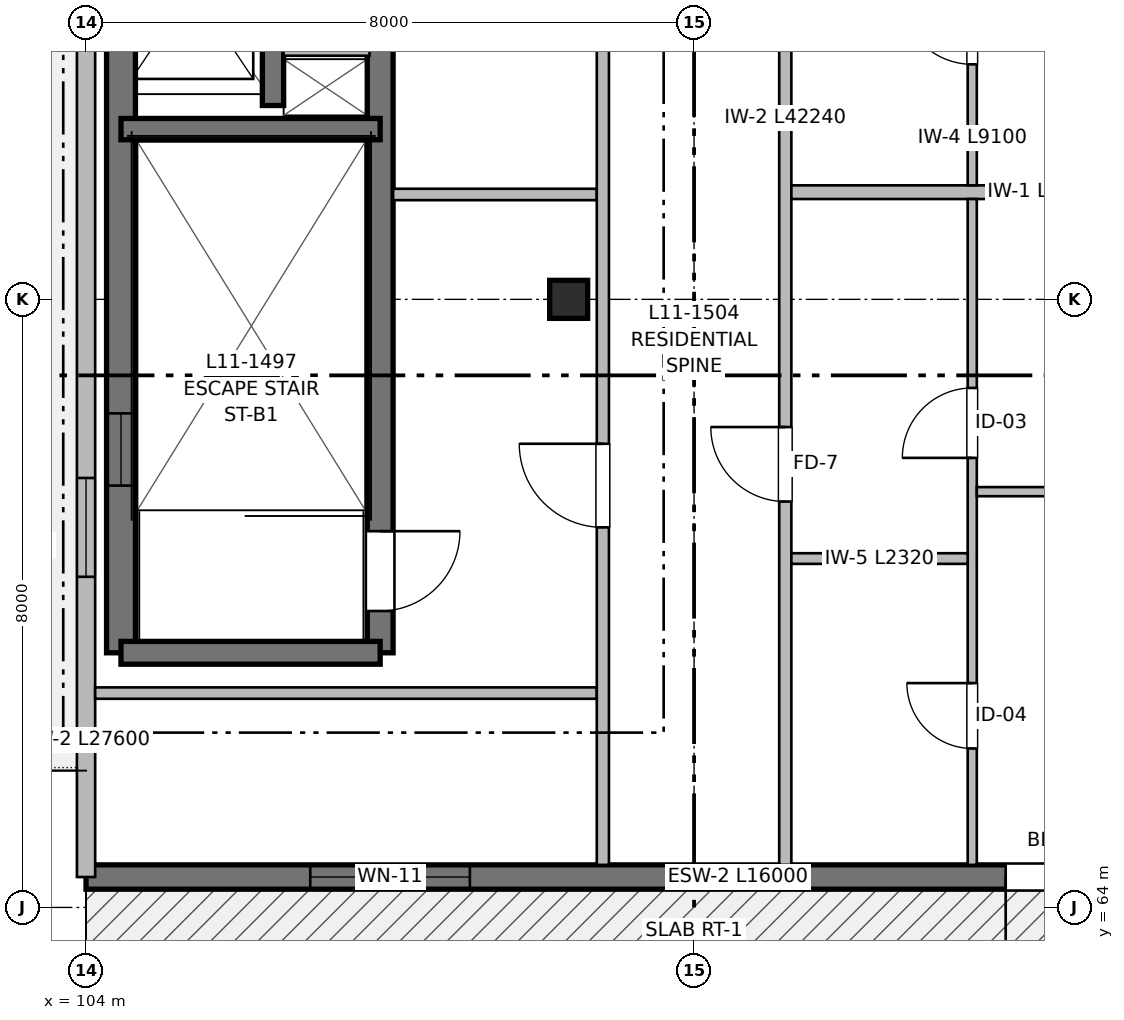
"""IFC4 building model, lengths in metres.
Left out: names, types, materials, properties, quantities, classifications, styles, units other than length and angle.
Written with IfcOpenShell. Run it as: python <this file> out.ifc"""

import sys

from ifc_helpers import new_model, si_unit, direction, frame, frame_2d, origin, origin_2d, place, context, subcontext, project, spatial, rectangle, extrude, element, fill, save


model = new_model("IFC4")
c1 = context("Model", 3, precision=1e-05, world=origin(), true_north=direction((0.0, 1.0)))
c2 = subcontext(c1, "Body", "Model", "MODEL_VIEW")
j1 = project(units=[si_unit("LENGTHUNIT", "METRE"), si_unit("PLANEANGLEUNIT", "RADIAN")], contexts=[c1])
p1 = place(None, origin())
s1 = spatial("IfcSite", under=j1, at=p1, CompositionType="ELEMENT")
p2 = place(p1, origin())
s2 = spatial("IfcBuilding", under=s1, at=p2, CompositionType="ELEMENT")
p3 = place(p2, frame((0.0, 0.0, 36.16)))
s3 = spatial("IfcBuildingStorey", under=s2, at=p3, CompositionType="ELEMENT", Elevation=36.16)
p4 = place(p3, frame((110.35, 72.0, 0.0), z_axis=(0.0, 0.0, 1.0), x_axis=(1.0, 0.0, 0.0)))
e1 = element("IfcColumn", 1, at=p4, inside=s3, PredefinedType="COLUMN", context=c2, shape_type="SweptSolid", body=[
    extrude(rectangle(XDim=0.5, YDim=0.5, at=origin_2d()), origin(), (0.0, 0.0, 1.0), 3.2),
])
p5 = place(p3, frame((104.46, 67.35, 0.0), z_axis=(0.0, 0.0, 1.0), x_axis=(0.0, 1.0, 0.0)))
e2 = element("IfcWall", 2, at=p5, inside=s3, PredefinedType="SHEAR", context=c2, shape_type="SweptSolid", body=[
    extrude(rectangle(XDim=12.45, YDim=0.38, at=frame_2d((6.225, 0.0))), origin(), (0.0, 0.0, 1.0), 3.2),
])
p6 = place(p5, frame((2.2, 0.0, 0.97)))
e3 = element("IfcOpeningElement", 3, at=p6, cuts=e2, PredefinedType="OPENING", context=c2, shape_type="SweptSolid", body=[
    extrude(rectangle(XDim=0.95, YDim=1.25, at=frame_2d((0.475, 0.625))), frame((0.0, 0.2, 0.0), z_axis=(0.0, -1.0, 0.0), x_axis=(1.0, 0.0, 0.0)), (0.0, 0.0, 1.0), 0.4),
])
p7 = place(p3, frame((107.87, 79.8, 0.0), z_axis=(0.0, 0.0, 1.0), x_axis=(0.0, -1.0, 0.0)))
e4 = element("IfcWall", 4, at=p7, inside=s3, PredefinedType="SHEAR", context=c2, shape_type="SweptSolid", body=[
    extrude(rectangle(XDim=12.45, YDim=0.34, at=frame_2d((6.225, 0.0))), origin(), (0.0, 0.0, 1.0), 3.2),
])
p8 = place(p7, frame((10.85, 0.0, 0.0)))
e5 = element("IfcOpeningElement", 5, at=p8, cuts=e4, PredefinedType="OPENING", context=c2, shape_type="SweptSolid", body=[
    extrude(rectangle(XDim=1.05, YDim=2.15, at=frame_2d((0.525, 1.075))), frame((0.0, 0.18, 0.0), z_axis=(0.0, -1.0, 0.0), x_axis=(1.0, 0.0, 0.0)), (0.0, 0.0, 1.0), 0.36),
])
p9 = place(p3, frame((107.87, 67.35, 0.0), z_axis=(0.0, 0.0, 1.0), x_axis=(-1.0, 0.0, 0.0)))
e6 = element("IfcWall", 6, at=p9, inside=s3, PredefinedType="SHEAR", context=c2, shape_type="SweptSolid", body=[
    extrude(rectangle(XDim=3.41, YDim=0.3, at=frame_2d((1.705, 0.0))), origin(), (0.0, 0.0, 1.0), 3.2),
])
p10 = place(p3, frame((104.46, 74.24, 0.0), z_axis=(0.0, 0.0, 1.0), x_axis=(1.0, 0.0, 0.0)))
e7 = element("IfcWall", 7, at=p10, inside=s3, PredefinedType="SHEAR", context=c2, shape_type="SweptSolid", body=[
    extrude(rectangle(XDim=3.41, YDim=0.28, at=frame_2d((1.705, 0.0))), origin(), (0.0, 0.0, 1.0), 3.2),
])
p11 = place(p3, frame((106.46, 74.55, 0.0), z_axis=(0.0, 0.0, 1.0), x_axis=(0.0, 1.0, 0.0)))
e8 = element("IfcWall", 8, at=p11, inside=s3, PredefinedType="SHEAR", context=c2, shape_type="SweptSolid", body=[
    extrude(rectangle(XDim=5.25, YDim=0.28, at=frame_2d((2.625, 0.0))), origin(), (0.0, 0.0, 1.0), 3.2),
])
p12 = place(p11, frame((1.15, 0.0, 0.0)))
e9 = element("IfcOpeningElement", 9, at=p12, cuts=e8, PredefinedType="OPENING", context=c2, shape_type="SweptSolid", body=[
    extrude(rectangle(XDim=1.0, YDim=2.15, at=frame_2d((0.5, 1.075))), frame((0.0, 0.15, 0.0), z_axis=(0.0, -1.0, 0.0), x_axis=(1.0, 0.0, 0.0)), (0.0, 0.0, 1.0), 0.3),
])
p13 = place(p11, frame((3.85, 0.0, 0.0)))
e10 = element("IfcOpeningElement", 10, at=p13, cuts=e8, PredefinedType="OPENING", context=c2, shape_type="SweptSolid", body=[
    extrude(rectangle(XDim=0.9, YDim=2.15, at=frame_2d((0.45, 1.075))), frame((0.0, 0.15, 0.0), z_axis=(0.0, -1.0, 0.0), x_axis=(1.0, 0.0, 0.0)), (0.0, 0.0, 1.0), 0.3),
])
p14 = place(p3, frame((106.6, 75.28, 0.0), z_axis=(0.0, 0.0, 1.0), x_axis=(1.0, 0.0, 0.0)))
e11 = element("IfcWall", 11, at=p14, inside=s3, PredefinedType="PARTITIONING", context=c2, shape_type="SweptSolid", body=[
    extrude(rectangle(XDim=1.13, YDim=0.15, at=frame_2d((0.565, 0.0))), origin(), (0.0, 0.0, 1.0), 2.95),
])
p15 = place(p3, frame((120.0, 64.4, 0.0), z_axis=(0.0, 0.0, 1.0), x_axis=(-1.0, 0.0, 0.0)))
e12 = element("IfcWall", 12, at=p15, inside=s3, PredefinedType="SHEAR", context=c2, shape_type="SweptSolid", body=[
    extrude(rectangle(XDim=16.0, YDim=0.32, at=frame_2d((8.0, 0.0))), origin(), (0.0, 0.0, 1.0), 2.98),
])
p16 = place(p15, frame((2.55, 0.0, 0.0)))
e13 = element("IfcOpeningElement", 13, at=p16, cuts=e12, PredefinedType="OPENING", context=c2, shape_type="SweptSolid", body=[
    extrude(rectangle(XDim=1.35, YDim=2.2, at=frame_2d((0.675, 1.1))), frame((0.0, 0.17, 0.0), z_axis=(0.0, -1.0, 0.0), x_axis=(1.0, 0.0, 0.0)), (0.0, 0.0, 1.0), 0.34),
])
p17 = place(p15, frame((10.95, 0.0, 0.67)))
e14 = element("IfcOpeningElement", 14, at=p17, cuts=e12, PredefinedType="OPENING", context=c2, shape_type="SweptSolid", body=[
    extrude(rectangle(XDim=2.1, YDim=1.55, at=frame_2d((1.05, 0.775))), frame((0.0, 0.17, 0.0), z_axis=(0.0, -1.0, 0.0), x_axis=(1.0, 0.0, 0.0)), (0.0, 0.0, 1.0), 0.34),
])
p18 = place(p3, frame((104.0, 64.4, 0.0), z_axis=(0.0, 0.0, 1.0), x_axis=(0.0, 1.0, 0.0)))
e15 = element("IfcWall", 15, at=p18, inside=s3, PredefinedType="SOLIDWALL", context=c2, shape_type="SweptSolid", body=[
    extrude(rectangle(XDim=27.6, YDim=0.24, at=frame_2d((13.8, 0.0))), origin(), (0.0, 0.0, 1.0), 2.98),
])
p19 = place(p18, frame((3.95, 0.0, 0.82)))
e16 = element("IfcOpeningElement", 16, at=p19, cuts=e15, PredefinedType="OPENING", context=c2, shape_type="SweptSolid", body=[
    extrude(rectangle(XDim=1.3, YDim=1.4, at=frame_2d((0.65, 0.7))), frame((0.0, 0.13, 0.0), z_axis=(0.0, -1.0, 0.0), x_axis=(1.0, 0.0, 0.0)), (0.0, 0.0, 1.0), 0.26),
])
p20 = place(p18, frame((10.95, 0.0, 0.67)))
e17 = element("IfcOpeningElement", 17, at=p20, cuts=e15, PredefinedType="OPENING", context=c2, shape_type="SweptSolid", body=[
    extrude(rectangle(XDim=2.1, YDim=1.55, at=frame_2d((1.05, 0.775))), frame((0.0, 0.13, 0.0), z_axis=(0.0, -1.0, 0.0), x_axis=(1.0, 0.0, 0.0)), (0.0, 0.0, 1.0), 0.26),
])
p21 = place(p18, frame((21.6, 0.0, 0.0)))
e18 = element("IfcOpeningElement", 18, at=p21, cuts=e15, PredefinedType="OPENING", context=c2, shape_type="SweptSolid", body=[
    extrude(rectangle(XDim=1.2, YDim=2.2, at=frame_2d((0.6, 1.1))), frame((0.0, 0.13, 0.0), z_axis=(0.0, -1.0, 0.0), x_axis=(1.0, 0.0, 0.0)), (0.0, 0.0, 1.0), 0.26),
])
p22 = place(p18, frame((24.3, 0.0, 0.77)))
e19 = element("IfcOpeningElement", 19, at=p22, cuts=e15, PredefinedType="OPENING", context=c2, shape_type="SweptSolid", body=[
    extrude(rectangle(XDim=1.6, YDim=1.45, at=frame_2d((0.8, 0.725))), frame((0.0, 0.13, 0.0), z_axis=(0.0, -1.0, 0.0), x_axis=(1.0, 0.0, 0.0)), (0.0, 0.0, 1.0), 0.26),
])
p23 = place(p3, frame((104.12, 66.82, 0.0), z_axis=(0.0, 0.0, 1.0), x_axis=(1.0, 0.0, 0.0)))
e20 = element("IfcWall", 20, at=p23, inside=s3, PredefinedType="PARTITIONING", context=c2, shape_type="SweptSolid", body=[
    extrude(rectangle(XDim=6.6, YDim=0.15, at=frame_2d((3.3, 0.0))), origin(), (0.0, 0.0, 1.0), 2.935),
])
p24 = place(p3, frame((108.04, 73.38, 0.0), z_axis=(0.0, 0.0, 1.0), x_axis=(1.0, 0.0, 0.0)))
e21 = element("IfcWall", 21, at=p24, inside=s3, PredefinedType="PARTITIONING", context=c2, shape_type="SweptSolid", body=[
    extrude(rectangle(XDim=2.68, YDim=0.15, at=frame_2d((1.34, 0.0))), origin(), (0.0, 0.0, 1.0), 2.935),
])
p25 = place(p3, frame((110.8, 64.56, 0.0), z_axis=(0.0, 0.0, 1.0), x_axis=(0.0, 1.0, 0.0)))
e22 = element("IfcWall", 22, at=p25, inside=s3, PredefinedType="PARTITIONING", context=c2, shape_type="SweptSolid", body=[
    extrude(rectangle(XDim=42.24, YDim=0.16, at=frame_2d((21.12, 0.0))), origin(), (0.0, 0.0, 1.0), 2.935),
])
p26 = place(p25, frame((4.44, 0.0, 0.0)))
e23 = element("IfcOpeningElement", 23, at=p26, cuts=e22, PredefinedType="OPENING", context=c2, shape_type="SweptSolid", body=[
    extrude(rectangle(XDim=1.1, YDim=2.15, at=frame_2d((0.55, 1.075))), frame((0.0, 0.09, 0.0), z_axis=(0.0, -1.0, 0.0), x_axis=(1.0, 0.0, 0.0)), (0.0, 0.0, 1.0), 0.18),
])
p27 = place(p25, frame((10.84, 0.0, 0.0)))
e24 = element("IfcOpeningElement", 24, at=p27, cuts=e22, PredefinedType="OPENING", context=c2, shape_type="SweptSolid", body=[
    extrude(rectangle(XDim=1.6, YDim=2.15, at=frame_2d((0.8, 1.075))), frame((0.0, 0.09, 0.0), z_axis=(0.0, -1.0, 0.0), x_axis=(1.0, 0.0, 0.0)), (0.0, 0.0, 1.0), 0.18),
])
p28 = place(p25, frame((24.245, 0.0, 0.0)))
e25 = element("IfcOpeningElement", 25, at=p28, cuts=e22, PredefinedType="OPENING", context=c2, shape_type="SweptSolid", body=[
    extrude(rectangle(XDim=0.98, YDim=2.15, at=frame_2d((0.49, 1.075))), frame((0.0, 0.09, 0.0), z_axis=(0.0, -1.0, 0.0), x_axis=(1.0, 0.0, 0.0)), (0.0, 0.0, 1.0), 0.18),
])
p29 = place(p25, frame((32.855, 0.0, 0.0)))
e26 = element("IfcOpeningElement", 26, at=p29, cuts=e22, PredefinedType="OPENING", context=c2, shape_type="SweptSolid", body=[
    extrude(rectangle(XDim=0.98, YDim=2.15, at=frame_2d((0.49, 1.075))), frame((0.0, 0.09, 0.0), z_axis=(0.0, -1.0, 0.0), x_axis=(1.0, 0.0, 0.0)), (0.0, 0.0, 1.0), 0.18),
])
p30 = place(p3, frame((113.2, 64.56, 0.0), z_axis=(0.0, 0.0, 1.0), x_axis=(0.0, 1.0, 0.0)))
e27 = element("IfcWall", 27, at=p30, inside=s3, PredefinedType="PARTITIONING", context=c2, shape_type="SweptSolid", body=[
    extrude(rectangle(XDim=42.24, YDim=0.16, at=frame_2d((21.12, 0.0))), origin(), (0.0, 0.0, 1.0), 2.935),
])
p31 = place(p30, frame((4.78, 0.0, 0.0)))
e28 = element("IfcOpeningElement", 28, at=p31, cuts=e27, PredefinedType="OPENING", context=c2, shape_type="SweptSolid", body=[
    extrude(rectangle(XDim=0.98, YDim=2.15, at=frame_2d((0.49, 1.075))), frame((0.0, 0.09, 0.0), z_axis=(0.0, -1.0, 0.0), x_axis=(1.0, 0.0, 0.0)), (0.0, 0.0, 1.0), 0.18),
])
p32 = place(p30, frame((13.88, 0.0, 0.0)))
e29 = element("IfcOpeningElement", 29, at=p32, cuts=e27, PredefinedType="OPENING", context=c2, shape_type="SweptSolid", body=[
    extrude(rectangle(XDim=1.02, YDim=2.15, at=frame_2d((0.51, 1.075))), frame((0.0, 0.09, 0.0), z_axis=(0.0, -1.0, 0.0), x_axis=(1.0, 0.0, 0.0)), (0.0, 0.0, 1.0), 0.18),
])
p33 = place(p30, frame((23.93, 0.0, 0.0)))
e30 = element("IfcOpeningElement", 30, at=p33, cuts=e27, PredefinedType="OPENING", context=c2, shape_type="SweptSolid", body=[
    extrude(rectangle(XDim=0.98, YDim=2.15, at=frame_2d((0.49, 1.075))), frame((0.0, 0.09, 0.0), z_axis=(0.0, -1.0, 0.0), x_axis=(1.0, 0.0, 0.0)), (0.0, 0.0, 1.0), 0.18),
])
p34 = place(p30, frame((35.9, 0.0, 0.0)))
e31 = element("IfcOpeningElement", 31, at=p34, cuts=e27, PredefinedType="OPENING", context=c2, shape_type="SweptSolid", body=[
    extrude(rectangle(XDim=0.98, YDim=2.15, at=frame_2d((0.49, 1.075))), frame((0.0, 0.09, 0.0), z_axis=(0.0, -1.0, 0.0), x_axis=(1.0, 0.0, 0.0)), (0.0, 0.0, 1.0), 0.18),
])
p35 = place(p3, frame((113.28, 73.41, 0.0), z_axis=(0.0, 0.0, 1.0), x_axis=(1.0, 0.0, 0.0)))
e32 = element("IfcWall", 32, at=p35, inside=s3, PredefinedType="PARTITIONING", context=c2, shape_type="SweptSolid", body=[
    extrude(rectangle(XDim=6.6, YDim=0.18, at=frame_2d((3.3, 0.0))), origin(), (0.0, 0.0, 1.0), 2.935),
])
p36 = place(p3, frame((115.66, 64.56, 0.0), z_axis=(0.0, 0.0, 1.0), x_axis=(0.0, 1.0, 0.0)))
e33 = element("IfcWall", 33, at=p36, inside=s3, PredefinedType="PARTITIONING", context=c2, shape_type="SweptSolid", body=[
    extrude(rectangle(XDim=8.76, YDim=0.12, at=frame_2d((4.38, 0.0))), origin(), (0.0, 0.0, 1.0), 2.935),
])
p37 = place(p36, frame((1.531, 0.0, 0.0)))
e34 = element("IfcOpeningElement", 34, at=p37, cuts=e33, PredefinedType="OPENING", context=c2, shape_type="SweptSolid", body=[
    extrude(rectangle(XDim=0.86, YDim=2.1, at=frame_2d((0.43, 1.05))), frame((0.0, 0.07, 0.0), z_axis=(0.0, -1.0, 0.0), x_axis=(1.0, 0.0, 0.0)), (0.0, 0.0, 1.0), 0.14),
])
p38 = place(p36, frame((5.354, 0.0, 0.0)))
e35 = element("IfcOpeningElement", 35, at=p38, cuts=e33, PredefinedType="OPENING", context=c2, shape_type="SweptSolid", body=[
    extrude(rectangle(XDim=0.92, YDim=2.1, at=frame_2d((0.46, 1.05))), frame((0.0, 0.07, 0.0), z_axis=(0.0, -1.0, 0.0), x_axis=(1.0, 0.0, 0.0)), (0.0, 0.0, 1.0), 0.14),
])
p39 = place(p3, frame((113.28, 68.59, 0.0), z_axis=(0.0, 0.0, 1.0), x_axis=(1.0, 0.0, 0.0)))
e36 = element("IfcWall", 36, at=p39, inside=s3, PredefinedType="PARTITIONING", context=c2, shape_type="SweptSolid", body=[
    extrude(rectangle(XDim=2.32, YDim=0.14, at=frame_2d((1.16, 0.0))), origin(), (0.0, 0.0, 1.0), 2.935),
])
p40 = place(p3, frame((115.72, 69.47, 0.0), z_axis=(0.0, 0.0, 1.0), x_axis=(1.0, 0.0, 0.0)))
e37 = element("IfcWall", 37, at=p40, inside=s3, PredefinedType="PARTITIONING", context=c2, shape_type="SweptSolid", body=[
    extrude(rectangle(XDim=4.16, YDim=0.12, at=frame_2d((2.08, 0.0))), origin(), (0.0, 0.0, 1.0), 2.935),
])
p41 = place(p40, frame((1.63, 0.0, 0.0)))
e38 = element("IfcOpeningElement", 38, at=p41, cuts=e37, PredefinedType="OPENING", context=c2, shape_type="SweptSolid", body=[
    extrude(rectangle(XDim=0.9, YDim=2.1, at=frame_2d((0.45, 1.05))), frame((0.0, 0.07, 0.0), z_axis=(0.0, -1.0, 0.0), x_axis=(1.0, 0.0, 0.0)), (0.0, 0.0, 1.0), 0.14),
])
p42 = place(p3, frame((115.66, 73.5, 0.0), z_axis=(0.0, 0.0, 1.0), x_axis=(0.0, 1.0, 0.0)))
e39 = element("IfcWall", 39, at=p42, inside=s3, PredefinedType="PARTITIONING", context=c2, shape_type="SweptSolid", body=[
    extrude(rectangle(XDim=9.1, YDim=0.12, at=frame_2d((4.55, 0.0))), origin(), (0.0, 0.0, 1.0), 2.935),
])
p43 = place(p42, frame((1.592, 0.0, 0.0)))
e40 = element("IfcOpeningElement", 40, at=p43, cuts=e39, PredefinedType="OPENING", context=c2, shape_type="SweptSolid", body=[
    extrude(rectangle(XDim=0.94, YDim=2.1, at=frame_2d((0.47, 1.05))), frame((0.0, 0.07, 0.0), z_axis=(0.0, -1.0, 0.0), x_axis=(1.0, 0.0, 0.0)), (0.0, 0.0, 1.0), 0.14),
])
p44 = place(p42, frame((5.565, 0.0, 0.0)))
e41 = element("IfcOpeningElement", 41, at=p44, cuts=e39, PredefinedType="OPENING", context=c2, shape_type="SweptSolid", body=[
    extrude(rectangle(XDim=0.92, YDim=2.1, at=frame_2d((0.46, 1.05))), frame((0.0, 0.07, 0.0), z_axis=(0.0, -1.0, 0.0), x_axis=(1.0, 0.0, 0.0)), (0.0, 0.0, 1.0), 0.14),
])
p45 = place(p8, origin())
e42 = element("IfcDoor", 42, at=p45, inside=s3, OperationType="SINGLE_SWING_LEFT", PredefinedType="DOOR", context=c2, shape_type="SweptSolid", body=[
    extrude(rectangle(XDim=1.05, YDim=2.15, at=frame_2d((0.525, 1.075))), frame((0.0, 0.025, 0.0), z_axis=(0.0, -1.0, 0.0), x_axis=(1.0, 0.0, 0.0)), (0.0, 0.0, 1.0), 0.05),
])
fill(e5, e42)
p46 = place(p6, origin())
e43 = element("IfcWindow", 43, at=p46, inside=s3, PartitioningType="SINGLE_PANEL", PredefinedType="WINDOW", context=c2, shape_type="SweptSolid", body=[
    extrude(rectangle(XDim=0.95, YDim=1.25, at=frame_2d((0.475, 0.625))), frame((0.0, 0.03, 0.0), z_axis=(0.0, -1.0, 0.0), x_axis=(1.0, 0.0, 0.0)), (0.0, 0.0, 1.0), 0.06),
])
fill(e3, e43)
p47 = place(p16, origin())
e44 = element("IfcDoor", 44, at=p47, inside=s3, OperationType="SINGLE_SWING_RIGHT", PredefinedType="DOOR", context=c2, shape_type="SweptSolid", body=[
    extrude(rectangle(XDim=1.35, YDim=2.2, at=frame_2d((0.675, 1.1))), frame((0.0, 0.025, 0.0), z_axis=(0.0, -1.0, 0.0), x_axis=(1.0, 0.0, 0.0)), (0.0, 0.0, 1.0), 0.05),
])
fill(e13, e44)
p48 = place(p17, origin())
e45 = element("IfcWindow", 45, at=p48, inside=s3, PartitioningType="SINGLE_PANEL", PredefinedType="WINDOW", context=c2, shape_type="SweptSolid", body=[
    extrude(rectangle(XDim=2.1, YDim=1.55, at=frame_2d((1.05, 0.775))), frame((0.0, 0.03, 0.0), z_axis=(0.0, -1.0, 0.0), x_axis=(1.0, 0.0, 0.0)), (0.0, 0.0, 1.0), 0.06),
])
fill(e14, e45)
p49 = place(p19, origin())
e46 = element("IfcWindow", 46, at=p49, inside=s3, PartitioningType="SINGLE_PANEL", PredefinedType="WINDOW", context=c2, shape_type="SweptSolid", body=[
    extrude(rectangle(XDim=1.3, YDim=1.4, at=frame_2d((0.65, 0.7))), frame((0.0, 0.03, 0.0), z_axis=(0.0, -1.0, 0.0), x_axis=(1.0, 0.0, 0.0)), (0.0, 0.0, 1.0), 0.06),
])
fill(e16, e46)
p50 = place(p26, origin())
e47 = element("IfcDoor", 47, at=p50, inside=s3, OperationType="SINGLE_SWING_RIGHT", PredefinedType="DOOR", context=c2, shape_type="SweptSolid", body=[
    extrude(rectangle(XDim=1.1, YDim=2.15, at=frame_2d((0.55, 1.075))), frame((0.0, 0.025, 0.0), z_axis=(0.0, -1.0, 0.0), x_axis=(1.0, 0.0, 0.0)), (0.0, 0.0, 1.0), 0.05),
])
fill(e23, e47)
p51 = place(p37, origin())
e48 = element("IfcDoor", 48, at=p51, inside=s3, OperationType="SINGLE_SWING_RIGHT", PredefinedType="DOOR", context=c2, shape_type="SweptSolid", body=[
    extrude(rectangle(XDim=0.86, YDim=2.1, at=frame_2d((0.43, 1.05))), frame((0.0, 0.025, 0.0), z_axis=(0.0, -1.0, 0.0), x_axis=(1.0, 0.0, 0.0)), (0.0, 0.0, 1.0), 0.05),
])
fill(e34, e48)
p52 = place(p38, origin())
e49 = element("IfcDoor", 49, at=p52, inside=s3, OperationType="SINGLE_SWING_LEFT", PredefinedType="DOOR", context=c2, shape_type="SweptSolid", body=[
    extrude(rectangle(XDim=0.92, YDim=2.1, at=frame_2d((0.46, 1.05))), frame((0.0, 0.025, 0.0), z_axis=(0.0, -1.0, 0.0), x_axis=(1.0, 0.0, 0.0)), (0.0, 0.0, 1.0), 0.05),
])
fill(e35, e49)
p53 = place(p31, origin())
e50 = element("IfcDoor", 50, at=p53, inside=s3, OperationType="SINGLE_SWING_RIGHT", PredefinedType="DOOR", context=c2, shape_type="SweptSolid", body=[
    extrude(rectangle(XDim=0.98, YDim=2.15, at=frame_2d((0.49, 1.075))), frame((0.0, 0.025, 0.0), z_axis=(0.0, -1.0, 0.0), x_axis=(1.0, 0.0, 0.0)), (0.0, 0.0, 1.0), 0.05),
])
fill(e28, e50)
p54 = place(p43, origin())
e51 = element("IfcDoor", 51, at=p54, inside=s3, OperationType="SINGLE_SWING_RIGHT", PredefinedType="DOOR", context=c2, shape_type="SweptSolid", body=[
    extrude(rectangle(XDim=0.94, YDim=2.1, at=frame_2d((0.47, 1.05))), frame((0.0, 0.025, 0.0), z_axis=(0.0, -1.0, 0.0), x_axis=(1.0, 0.0, 0.0)), (0.0, 0.0, 1.0), 0.05),
])
fill(e40, e51)
save(model, sys.argv[1])
